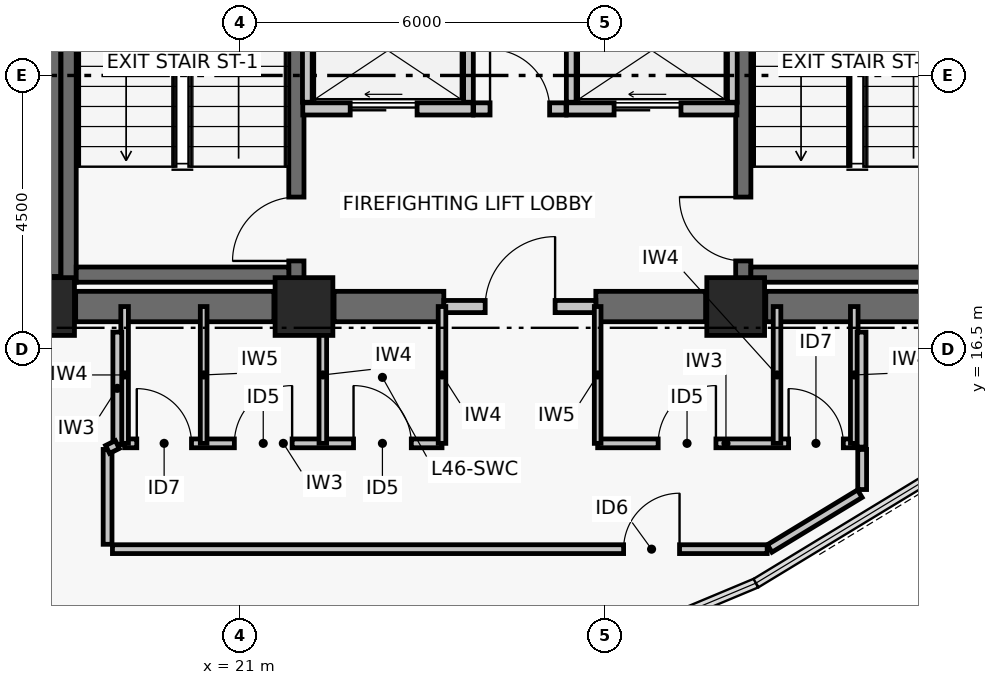
"""IFC4 building model, lengths in metres.
Left out: names, types, materials, properties, quantities, classifications, styles, units other than length and angle.
Written with IfcOpenShell. Run it as: python <this file> out.ifc"""

import sys

from ifc_helpers import new_model, si_unit, direction, frame, frame_2d, origin, origin_2d, place, context, subcontext, project, spatial, rectangle, extrude, element, fill, save


model = new_model("IFC4")
c1 = context("Model", 3, precision=1e-05, world=origin(), true_north=direction((0.0, 1.0)))
c2 = subcontext(c1, "Body", "Model", "MODEL_VIEW")
j1 = project(units=[si_unit("LENGTHUNIT", "METRE"), si_unit("PLANEANGLEUNIT", "RADIAN")], contexts=[c1])
p1 = place(None, origin())
s1 = spatial("IfcSite", under=j1, at=p1, CompositionType="ELEMENT")
p2 = place(p1, origin())
s2 = spatial("IfcBuilding", under=s1, at=p2, CompositionType="ELEMENT")
p3 = place(p2, frame((0.0, 0.0, 184.08)))
s3 = spatial("IfcBuildingStorey", under=s2, at=p3, CompositionType="ELEMENT", Elevation=184.08)
for number, where, z_axis, x_axis in (
    (1, (17.8, 17.2, 0.0), (0.0, 0.0, 1.0), (1.0, 0.0, 0.0)),
    (2, (22.05, 17.2, 0.0), (0.0, 0.0, 1.0), (1.0, 0.0, 0.0)),
    (3, (29.15, 17.2, 0.0), (0.0, 0.0, 1.0), (1.0, 0.0, 0.0)),
):
    element("IfcColumn", number, at=place(p3, frame(where, z_axis=z_axis, x_axis=x_axis)), inside=s3, PredefinedType="COLUMN", context=c2, shape_type="SweptSolid", body=[
        extrude(rectangle(XDim=0.95, YDim=0.95, at=origin_2d()), origin(), (0.0, 0.0, 1.0), 3.72),
    ])
p4 = place(p3, frame((18.295, 17.2, 0.0), z_axis=(0.0, 0.0, 1.0), x_axis=(1.0, 0.0, 0.0)))
e4 = element("IfcWall", 4, at=p4, inside=s3, PredefinedType="SHEAR", context=c2, shape_type="SweptSolid", body=[
    extrude(rectangle(XDim=3.26, YDim=0.5, at=frame_2d((1.63, 0.0))), origin(), (0.0, 0.0, 1.0), 3.5),
])
p5 = place(p3, frame((22.545, 17.2, 0.0), z_axis=(0.0, 0.0, 1.0), x_axis=(1.0, 0.0, 0.0)))
e5 = element("IfcWall", 5, at=p5, inside=s3, PredefinedType="SHEAR", context=c2, shape_type="SweptSolid", body=[
    extrude(rectangle(XDim=1.805, YDim=0.5, at=frame_2d((0.903, 0.0))), origin(), (0.0, 0.0, 1.0), 3.5),
])
p6 = place(p3, frame((26.85, 17.2, 0.0), z_axis=(0.0, 0.0, 1.0), x_axis=(1.0, 0.0, 0.0)))
e6 = element("IfcWall", 6, at=p6, inside=s3, PredefinedType="SHEAR", context=c2, shape_type="SweptSolid", body=[
    extrude(rectangle(XDim=1.805, YDim=0.5, at=frame_2d((0.902, 0.0))), origin(), (0.0, 0.0, 1.0), 3.5),
])
p7 = place(p3, frame((29.645, 17.2, 0.0), z_axis=(0.0, 0.0, 1.0), x_axis=(1.0, 0.0, 0.0)))
e7 = element("IfcWall", 7, at=p7, inside=s3, PredefinedType="SHEAR", context=c2, shape_type="SweptSolid", body=[
    extrude(rectangle(XDim=3.26, YDim=0.5, at=frame_2d((1.63, 0.0))), origin(), (0.0, 0.0, 1.0), 3.5),
])
p8 = place(p3, frame((17.8, 17.695, 0.0), z_axis=(0.0, 0.0, 1.0), x_axis=(0.0, 1.0, 0.0)))
e8 = element("IfcWall", 8, at=p8, inside=s3, PredefinedType="SHEAR", context=c2, shape_type="SweptSolid", body=[
    extrude(rectangle(XDim=8.61, YDim=0.5, at=frame_2d((4.305, 0.0))), origin(), (0.0, 0.0, 1.0), 3.5),
])
p9 = place(p3, frame((18.179, 17.6, 0.0), z_axis=(0.0, 0.0, 1.0), x_axis=(0.0, 1.0, 0.0)))
e9 = element("IfcWall", 9, at=p9, inside=s3, PredefinedType="SHEAR", context=c2, shape_type="SweptSolid", body=[
    extrude(rectangle(XDim=8.8, YDim=0.25, at=frame_2d((4.4, 0.0))), origin(), (0.0, 0.0, 1.0), 3.5),
])
p10 = place(p3, frame((21.925, 17.6, 0.0), z_axis=(0.0, 0.0, 1.0), x_axis=(0.0, 1.0, 0.0)))
e10 = element("IfcWall", 10, at=p10, inside=s3, PredefinedType="SHEAR", context=c2, shape_type="SweptSolid", body=[
    extrude(rectangle(XDim=8.8, YDim=0.25, at=frame_2d((4.4, 0.0))), origin(), (0.0, 0.0, 1.0), 3.5),
])
p11 = place(p10, frame((0.35, 0.0, 0.0)))
e11 = element("IfcOpeningElement", 11, at=p11, cuts=e10, PredefinedType="OPENING", context=c2, shape_type="SweptSolid", body=[
    extrude(rectangle(XDim=1.05, YDim=2.08, at=frame_2d((0.525, 1.04))), frame((0.0, 0.135, 0.0), z_axis=(0.0, -1.0, 0.0), x_axis=(1.0, 0.0, 0.0)), (0.0, 0.0, 1.0), 0.27),
])
p12 = place(p3, frame((18.304, 17.725, 0.0), z_axis=(0.0, 0.0, 1.0), x_axis=(1.0, 0.0, 0.0)))
e12 = element("IfcWall", 12, at=p12, inside=s3, PredefinedType="SHEAR", context=c2, shape_type="SweptSolid", body=[
    extrude(rectangle(XDim=3.496, YDim=0.25, at=frame_2d((1.748, 0.0))), origin(), (0.0, 0.0, 1.0), 3.5),
])
p13 = place(p3, frame((29.275, 17.6, 0.0), z_axis=(0.0, 0.0, 1.0), x_axis=(0.0, 1.0, 0.0)))
e13 = element("IfcWall", 13, at=p13, inside=s3, PredefinedType="SHEAR", context=c2, shape_type="SweptSolid", body=[
    extrude(rectangle(XDim=8.8, YDim=0.25, at=frame_2d((4.4, 0.0))), origin(), (0.0, 0.0, 1.0), 3.5),
])
p14 = place(p13, frame((0.35, 0.0, 0.0)))
e14 = element("IfcOpeningElement", 14, at=p14, cuts=e13, PredefinedType="OPENING", context=c2, shape_type="SweptSolid", body=[
    extrude(rectangle(XDim=1.05, YDim=2.08, at=frame_2d((0.525, 1.04))), frame((0.0, 0.135, 0.0), z_axis=(0.0, -1.0, 0.0), x_axis=(1.0, 0.0, 0.0)), (0.0, 0.0, 1.0), 0.27),
])
p15 = place(p3, frame((29.4, 17.725, 0.0), z_axis=(0.0, 0.0, 1.0), x_axis=(1.0, 0.0, 0.0)))
e15 = element("IfcWall", 15, at=p15, inside=s3, PredefinedType="SHEAR", context=c2, shape_type="SweptSolid", body=[
    extrude(rectangle(XDim=3.496, YDim=0.25, at=frame_2d((1.748, 0.0))), origin(), (0.0, 0.0, 1.0), 3.5),
])
p16 = place(p3, frame((24.35, 17.2, 0.0), z_axis=(0.0, 0.0, 1.0), x_axis=(1.0, 0.0, 0.0)))
e16 = element("IfcWall", 16, at=p16, inside=s3, PredefinedType="PARTITIONING", context=c2, shape_type="SweptSolid", body=[
    extrude(rectangle(XDim=2.5, YDim=0.2, at=frame_2d((1.25, 0.0))), origin(), (0.0, 0.0, 1.0), 2.63),
])
p17 = place(p16, frame((0.68, 0.0, 0.0)))
e17 = element("IfcOpeningElement", 17, at=p17, cuts=e16, PredefinedType="OPENING", context=c2, shape_type="SweptSolid", body=[
    extrude(rectangle(XDim=1.15, YDim=2.08, at=frame_2d((0.575, 1.04))), frame((0.0, 0.11, 0.0), z_axis=(0.0, -1.0, 0.0), x_axis=(1.0, 0.0, 0.0)), (0.0, 0.0, 1.0), 0.22),
])
p18 = place(p3, frame((24.84, 20.45, 0.0), z_axis=(0.0, 0.0, 1.0), x_axis=(1.0, 0.0, 0.0)))
e18 = element("IfcWall", 18, at=p18, inside=s3, PredefinedType="PARTITIONING", context=c2, shape_type="SweptSolid", body=[
    extrude(rectangle(XDim=1.52, YDim=0.2, at=frame_2d((0.76, 0.0))), origin(), (0.0, 0.0, 1.0), 3.5),
])
p19 = place(p18, frame((0.27, 0.0, 0.0)))
e19 = element("IfcOpeningElement", 19, at=p19, cuts=e18, PredefinedType="OPENING", context=c2, shape_type="SweptSolid", body=[
    extrude(rectangle(XDim=0.98, YDim=2.06, at=frame_2d((0.49, 1.03))), frame((0.0, 0.11, 0.0), z_axis=(0.0, -1.0, 0.0), x_axis=(1.0, 0.0, 0.0)), (0.0, 0.0, 1.0), 0.22),
])
p20 = place(p3, frame((22.03, 20.45, 0.0), z_axis=(0.0, 0.0, 1.0), x_axis=(1.0, 0.0, 0.0)))
e20 = element("IfcWall", 20, at=p20, inside=s3, PredefinedType="PARTITIONING", context=c2, shape_type="SweptSolid", body=[
    extrude(rectangle(XDim=2.8, YDim=0.2, at=frame_2d((1.4, 0.0))), origin(), (0.0, 0.0, 1.0), 3.5),
])
p21 = place(p20, frame((0.78, 0.0, 0.0)))
e21 = element("IfcOpeningElement", 21, at=p21, cuts=e20, PredefinedType="OPENING", context=c2, shape_type="SweptSolid", body=[
    extrude(rectangle(XDim=1.1, YDim=2.08, at=frame_2d((0.55, 1.04))), frame((0.0, 0.11, 0.0), z_axis=(0.0, -1.0, 0.0), x_axis=(1.0, 0.0, 0.0)), (0.0, 0.0, 1.0), 0.22),
])
p22 = place(p3, frame((26.37, 20.45, 0.0), z_axis=(0.0, 0.0, 1.0), x_axis=(1.0, 0.0, 0.0)))
e22 = element("IfcWall", 22, at=p22, inside=s3, PredefinedType="PARTITIONING", context=c2, shape_type="SweptSolid", body=[
    extrude(rectangle(XDim=2.8, YDim=0.2, at=frame_2d((1.4, 0.0))), origin(), (0.0, 0.0, 1.0), 3.5),
])
p23 = place(p22, frame((0.78, 0.0, 0.0)))
e23 = element("IfcOpeningElement", 23, at=p23, cuts=e22, PredefinedType="OPENING", context=c2, shape_type="SweptSolid", body=[
    extrude(rectangle(XDim=1.1, YDim=2.08, at=frame_2d((0.55, 1.04))), frame((0.0, 0.11, 0.0), z_axis=(0.0, -1.0, 0.0), x_axis=(1.0, 0.0, 0.0)), (0.0, 0.0, 1.0), 0.22),
])
for number, where, z_axis, x_axis in (
    (24, (22.105, 20.56, 0.0), (0.0, 0.0, 1.0), (0.0, 1.0, 0.0)),
    (25, (24.755, 20.56, 0.0), (0.0, 0.0, 1.0), (0.0, 1.0, 0.0)),
):
    element("IfcWall", number, at=place(p3, frame(where, z_axis=z_axis, x_axis=x_axis)), inside=s3, PredefinedType="PARTITIONING", context=c2, shape_type="SweptSolid", body=[
        extrude(rectangle(XDim=1.71, YDim=0.16, at=frame_2d((0.855, 0.0))), origin(), (0.0, 0.0, 1.0), 3.5),
    ])
p24 = place(p3, frame((29.095, 20.56, 0.0), z_axis=(0.0, 0.0, 1.0), x_axis=(0.0, 1.0, 0.0)))
e26 = element("IfcWall", 26, at=p24, inside=s3, PredefinedType="PARTITIONING", context=c2, shape_type="SweptSolid", body=[
    extrude(rectangle(XDim=5.45, YDim=0.16, at=frame_2d((2.725, 0.0))), origin(), (0.0, 0.0, 1.0), 3.5),
])
p25 = place(p3, frame((26.445, 20.56, 0.0), z_axis=(0.0, 0.0, 1.0), x_axis=(0.0, 1.0, 0.0)))
e27 = element("IfcWall", 27, at=p25, inside=s3, PredefinedType="PARTITIONING", context=c2, shape_type="SweptSolid", body=[
    extrude(rectangle(XDim=1.71, YDim=0.16, at=frame_2d((0.855, 0.0))), origin(), (0.0, 0.0, 1.0), 3.5),
])
p26 = place(p3, frame((19.1, 14.95, 0.0), z_axis=(0.0, 0.0, 1.0), x_axis=(1.0, 0.0, 0.0)))
e28 = element("IfcWall", 28, at=p26, inside=s3, PredefinedType="PARTITIONING", context=c2, shape_type="SweptSolid", body=[
    extrude(rectangle(XDim=5.22, YDim=0.145, at=frame_2d((2.61, 0.0))), origin(), (0.0, 0.0, 1.0), 2.73),
])
p27 = place(p26, frame((0.2, 0.0, 0.0)))
e29 = element("IfcOpeningElement", 29, at=p27, cuts=e28, PredefinedType="OPENING", context=c2, shape_type="SweptSolid", body=[
    extrude(rectangle(XDim=0.9, YDim=2.02, at=frame_2d((0.45, 1.01))), frame((0.0, 0.083, 0.0), z_axis=(0.0, -1.0, 0.0), x_axis=(1.0, 0.0, 0.0)), (0.0, 0.0, 1.0), 0.165),
])
p28 = place(p26, frame((1.805, 0.0, 0.0)))
e30 = element("IfcOpeningElement", 30, at=p28, cuts=e28, PredefinedType="OPENING", context=c2, shape_type="SweptSolid", body=[
    extrude(rectangle(XDim=0.95, YDim=2.06, at=frame_2d((0.475, 1.03))), frame((0.0, 0.083, 0.0), z_axis=(0.0, -1.0, 0.0), x_axis=(1.0, 0.0, 0.0)), (0.0, 0.0, 1.0), 0.165),
])
p29 = place(p26, frame((3.765, 0.0, 0.0)))
e31 = element("IfcOpeningElement", 31, at=p29, cuts=e28, PredefinedType="OPENING", context=c2, shape_type="SweptSolid", body=[
    extrude(rectangle(XDim=0.95, YDim=2.06, at=frame_2d((0.475, 1.03))), frame((0.0, 0.083, 0.0), z_axis=(0.0, -1.0, 0.0), x_axis=(1.0, 0.0, 0.0)), (0.0, 0.0, 1.0), 0.165),
])
p30 = place(p3, frame((26.88, 14.95, 0.0), z_axis=(0.0, 0.0, 1.0), x_axis=(1.0, 0.0, 0.0)))
e32 = element("IfcWall", 32, at=p30, inside=s3, PredefinedType="PARTITIONING", context=c2, shape_type="SweptSolid", body=[
    extrude(rectangle(XDim=4.22, YDim=0.145, at=frame_2d((2.11, 0.0))), origin(), (0.0, 0.0, 1.0), 2.93),
])
p31 = place(p30, frame((0.995, 0.0, 0.0)))
e33 = element("IfcOpeningElement", 33, at=p31, cuts=e32, PredefinedType="OPENING", context=c2, shape_type="SweptSolid", body=[
    extrude(rectangle(XDim=0.95, YDim=2.06, at=frame_2d((0.475, 1.03))), frame((0.0, 0.083, 0.0), z_axis=(0.0, -1.0, 0.0), x_axis=(1.0, 0.0, 0.0)), (0.0, 0.0, 1.0), 0.165),
])
p32 = place(p30, frame((3.14, 0.0, 0.0)))
e34 = element("IfcOpeningElement", 34, at=p32, cuts=e32, PredefinedType="OPENING", context=c2, shape_type="SweptSolid", body=[
    extrude(rectangle(XDim=0.9, YDim=2.02, at=frame_2d((0.45, 1.01))), frame((0.0, 0.083, 0.0), z_axis=(0.0, -1.0, 0.0), x_axis=(1.0, 0.0, 0.0)), (0.0, 0.0, 1.0), 0.165),
])
p33 = place(p3, frame((19.1, 14.95, 0.0), z_axis=(0.0, 0.0, 1.0), x_axis=(0.0, 1.0, 0.0)))
e35 = element("IfcWall", 35, at=p33, inside=s3, PredefinedType="PARTITIONING", context=c2, shape_type="SweptSolid", body=[
    extrude(rectangle(XDim=2.25, YDim=0.125, at=frame_2d((1.125, 0.0))), origin(), (0.0, 0.0, 1.0), 2.63),
])
p34 = place(p3, frame((20.4, 14.95, 0.0), z_axis=(0.0, 0.0, 1.0), x_axis=(0.0, 1.0, 0.0)))
e36 = element("IfcWall", 36, at=p34, inside=s3, PredefinedType="PARTITIONING", context=c2, shape_type="SweptSolid", body=[
    extrude(rectangle(XDim=2.25, YDim=0.11, at=frame_2d((1.125, 0.0))), origin(), (0.0, 0.0, 1.0), 2.63),
])
for number, where, z_axis, x_axis in (
    (37, (22.36, 14.95, 0.0), (0.0, 0.0, 1.0), (0.0, 1.0, 0.0)),
    (38, (24.32, 14.95, 0.0), (0.0, 0.0, 1.0), (0.0, 1.0, 0.0)),
):
    element("IfcWall", number, at=place(p3, frame(where, z_axis=z_axis, x_axis=x_axis)), inside=s3, PredefinedType="PARTITIONING", context=c2, shape_type="SweptSolid", body=[
        extrude(rectangle(XDim=2.25, YDim=0.125, at=frame_2d((1.125, 0.0))), origin(), (0.0, 0.0, 1.0), 2.63),
    ])
p35 = place(p3, frame((26.88, 14.95, 0.0), z_axis=(0.0, 0.0, 1.0), x_axis=(0.0, 1.0, 0.0)))
e39 = element("IfcWall", 39, at=p35, inside=s3, PredefinedType="PARTITIONING", context=c2, shape_type="SweptSolid", body=[
    extrude(rectangle(XDim=2.25, YDim=0.11, at=frame_2d((1.125, 0.0))), origin(), (0.0, 0.0, 1.0), 2.63),
])
for number, where, z_axis, x_axis in (
    (40, (29.83, 14.95, 0.0), (0.0, 0.0, 1.0), (0.0, 1.0, 0.0)),
    (41, (31.1, 14.95, 0.0), (0.0, 0.0, 1.0), (0.0, 1.0, 0.0)),
):
    element("IfcWall", number, at=place(p3, frame(where, z_axis=z_axis, x_axis=x_axis)), inside=s3, PredefinedType="PARTITIONING", context=c2, shape_type="SweptSolid", body=[
        extrude(rectangle(XDim=2.25, YDim=0.125, at=frame_2d((1.125, 0.0))), origin(), (0.0, 0.0, 1.0), 2.63),
    ])
p36 = place(p3, frame((18.98, 16.78, 0.0), z_axis=(0.0, 0.0, 1.0), x_axis=(0.0, -1.0, 0.0)))
e42 = element("IfcWall", 42, at=p36, inside=s3, PredefinedType="PARTITIONING", context=c2, shape_type="SweptSolid", body=[
    extrude(rectangle(XDim=1.85, YDim=0.145, at=frame_2d((0.925, 0.0))), origin(), (0.0, 0.0, 1.0), 2.63),
])
p37 = place(p3, frame((18.82, 14.85, 0.0), z_axis=(0.0, 0.0, 1.0), x_axis=(0.0, -1.0, 0.0)))
e43 = element("IfcWall", 43, at=p37, inside=s3, PredefinedType="PARTITIONING", context=c2, shape_type="SweptSolid", body=[
    extrude(rectangle(XDim=1.56, YDim=0.145, at=frame_2d((0.78, 0.0))), origin(), (0.0, 0.0, 1.0), 3.08),
])
p38 = place(p3, frame((18.9, 13.21, 0.0), z_axis=(0.0, 0.0, 1.0), x_axis=(1.0, 0.0, 0.0)))
e44 = element("IfcWall", 44, at=p38, inside=s3, PredefinedType="PARTITIONING", context=c2, shape_type="SweptSolid", body=[
    extrude(rectangle(XDim=10.768, YDim=0.145, at=frame_2d((5.384, 0.0))), origin(), (0.0, 0.0, 1.0), 2.73),
])
p39 = place(p38, frame((8.406, 0.0, 0.0)))
e45 = element("IfcOpeningElement", 45, at=p39, cuts=e44, PredefinedType="OPENING", context=c2, shape_type="SweptSolid", body=[
    extrude(rectangle(XDim=0.92, YDim=2.05, at=frame_2d((0.46, 1.025))), frame((0.0, 0.083, 0.0), z_axis=(0.0, -1.0, 0.0), x_axis=(1.0, 0.0, 0.0)), (0.0, 0.0, 1.0), 0.165),
])
p40 = place(p3, frame((29.709, 13.222, 0.0), z_axis=(0.0, 0.0, 1.0), x_axis=(0.854635840942, 0.519227868451, 0.0)))
e46 = element("IfcWall", 46, at=p40, inside=s3, PredefinedType="PARTITIONING", context=c2, shape_type="SweptSolid", body=[
    extrude(rectangle(XDim=1.735, YDim=0.145, at=frame_2d((0.867, 0.0))), origin(), (0.0, 0.0, 1.0), 3.5),
])
p41 = place(p3, frame((31.23, 14.191, 0.0), z_axis=(0.0, 0.0, 1.0), x_axis=(0.0, 1.0, 0.0)))
e47 = element("IfcWall", 47, at=p41, inside=s3, PredefinedType="PARTITIONING", context=c2, shape_type="SweptSolid", body=[
    extrude(rectangle(XDim=0.659, YDim=0.145, at=frame_2d((0.33, 0.0))), origin(), (0.0, 0.0, 1.0), 3.5),
])
p42 = place(p3, frame((31.22, 14.889, 0.0), z_axis=(0.0, 0.0, 1.0), x_axis=(0.0, 1.0, 0.0)))
e48 = element("IfcWall", 48, at=p42, inside=s3, PredefinedType="PARTITIONING", context=c2, shape_type="SweptSolid", body=[
    extrude(rectangle(XDim=1.891, YDim=0.145, at=frame_2d((0.946, 0.0))), origin(), (0.0, 0.0, 1.0), 2.63),
])
p43 = place(p3, frame((18.82, 14.85, 0.0), z_axis=(0.0, 0.0, 1.0), x_axis=(0.89470021502, 0.446667130247, 0.0)))
e49 = element("IfcWall", 49, at=p43, inside=s3, PredefinedType="PARTITIONING", context=c2, shape_type="SweptSolid", body=[
    extrude(rectangle(XDim=0.179, YDim=0.145, at=frame_2d((0.089, 0.0))), origin(), (0.0, 0.0, 1.0), 3.5),
])
p44 = place(p11, origin())
e50 = element("IfcDoor", 50, at=p44, inside=s3, OperationType="SINGLE_SWING_LEFT", PredefinedType="DOOR", context=c2, shape_type="SweptSolid", body=[
    extrude(rectangle(XDim=1.05, YDim=2.08, at=frame_2d((0.525, 1.04))), frame((0.0, 0.025, 0.0), z_axis=(0.0, -1.0, 0.0), x_axis=(1.0, 0.0, 0.0)), (0.0, 0.0, 1.0), 0.05),
])
fill(e11, e50)
p45 = place(p14, origin())
e51 = element("IfcDoor", 51, at=p45, inside=s3, OperationType="SINGLE_SWING_RIGHT", PredefinedType="DOOR", context=c2, shape_type="SweptSolid", body=[
    extrude(rectangle(XDim=1.05, YDim=2.08, at=frame_2d((0.525, 1.04))), frame((0.0, 0.025, 0.0), z_axis=(0.0, -1.0, 0.0), x_axis=(1.0, 0.0, 0.0)), (0.0, 0.0, 1.0), 0.05),
])
fill(e14, e51)
p46 = place(p17, origin())
e52 = element("IfcDoor", 52, at=p46, inside=s3, OperationType="SINGLE_SWING_RIGHT", PredefinedType="DOOR", context=c2, shape_type="SweptSolid", body=[
    extrude(rectangle(XDim=1.15, YDim=2.08, at=frame_2d((0.575, 1.04))), frame((0.0, 0.025, 0.0), z_axis=(0.0, -1.0, 0.0), x_axis=(1.0, 0.0, 0.0)), (0.0, 0.0, 1.0), 0.05),
])
fill(e17, e52)
p47 = place(p19, origin())
e53 = element("IfcDoor", 53, at=p47, inside=s3, OperationType="SINGLE_SWING_LEFT", PredefinedType="DOOR", context=c2, shape_type="SweptSolid", body=[
    extrude(rectangle(XDim=0.98, YDim=2.06, at=frame_2d((0.49, 1.03))), frame((0.0, 0.025, 0.0), z_axis=(0.0, -1.0, 0.0), x_axis=(1.0, 0.0, 0.0)), (0.0, 0.0, 1.0), 0.05),
])
fill(e19, e53)
p48 = place(p21, origin())
e54 = element("IfcDoor", 54, at=p48, inside=s3, OperationType="DOUBLE_DOOR_SLIDING", PredefinedType="DOOR", context=c2, shape_type="SweptSolid", body=[
    extrude(rectangle(XDim=1.1, YDim=2.08, at=frame_2d((0.55, 1.04))), frame((0.0, 0.025, 0.0), z_axis=(0.0, -1.0, 0.0), x_axis=(1.0, 0.0, 0.0)), (0.0, 0.0, 1.0), 0.05),
])
fill(e21, e54)
p49 = place(p23, origin())
e55 = element("IfcDoor", 55, at=p49, inside=s3, OperationType="DOUBLE_DOOR_SLIDING", PredefinedType="DOOR", context=c2, shape_type="SweptSolid", body=[
    extrude(rectangle(XDim=1.1, YDim=2.08, at=frame_2d((0.55, 1.04))), frame((0.0, 0.025, 0.0), z_axis=(0.0, -1.0, 0.0), x_axis=(1.0, 0.0, 0.0)), (0.0, 0.0, 1.0), 0.05),
])
fill(e23, e55)
p50 = place(p27, origin())
e56 = element("IfcDoor", 56, at=p50, inside=s3, OperationType="SINGLE_SWING_LEFT", PredefinedType="DOOR", context=c2, shape_type="SweptSolid", body=[
    extrude(rectangle(XDim=0.9, YDim=2.02, at=frame_2d((0.45, 1.01))), frame((0.0, 0.025, 0.0), z_axis=(0.0, -1.0, 0.0), x_axis=(1.0, 0.0, 0.0)), (0.0, 0.0, 1.0), 0.05),
])
fill(e29, e56)
p51 = place(p28, origin())
e57 = element("IfcDoor", 57, at=p51, inside=s3, OperationType="SINGLE_SWING_RIGHT", PredefinedType="DOOR", context=c2, shape_type="SweptSolid", body=[
    extrude(rectangle(XDim=0.95, YDim=2.06, at=frame_2d((0.475, 1.03))), frame((0.0, 0.025, 0.0), z_axis=(0.0, -1.0, 0.0), x_axis=(1.0, 0.0, 0.0)), (0.0, 0.0, 1.0), 0.05),
])
fill(e30, e57)
p52 = place(p29, origin())
e58 = element("IfcDoor", 58, at=p52, inside=s3, OperationType="SINGLE_SWING_LEFT", PredefinedType="DOOR", context=c2, shape_type="SweptSolid", body=[
    extrude(rectangle(XDim=0.95, YDim=2.06, at=frame_2d((0.475, 1.03))), frame((0.0, 0.025, 0.0), z_axis=(0.0, -1.0, 0.0), x_axis=(1.0, 0.0, 0.0)), (0.0, 0.0, 1.0), 0.05),
])
fill(e31, e58)
p53 = place(p31, origin())
e59 = element("IfcDoor", 59, at=p53, inside=s3, OperationType="SINGLE_SWING_RIGHT", PredefinedType="DOOR", context=c2, shape_type="SweptSolid", body=[
    extrude(rectangle(XDim=0.95, YDim=2.06, at=frame_2d((0.475, 1.03))), frame((0.0, 0.025, 0.0), z_axis=(0.0, -1.0, 0.0), x_axis=(1.0, 0.0, 0.0)), (0.0, 0.0, 1.0), 0.05),
])
fill(e33, e59)
p54 = place(p32, origin())
e60 = element("IfcDoor", 60, at=p54, inside=s3, OperationType="SINGLE_SWING_LEFT", PredefinedType="DOOR", context=c2, shape_type="SweptSolid", body=[
    extrude(rectangle(XDim=0.9, YDim=2.02, at=frame_2d((0.45, 1.01))), frame((0.0, 0.025, 0.0), z_axis=(0.0, -1.0, 0.0), x_axis=(1.0, 0.0, 0.0)), (0.0, 0.0, 1.0), 0.05),
])
fill(e34, e60)
p55 = place(p39, origin())
e61 = element("IfcDoor", 61, at=p55, inside=s3, OperationType="SINGLE_SWING_RIGHT", PredefinedType="DOOR", context=c2, shape_type="SweptSolid", body=[
    extrude(rectangle(XDim=0.92, YDim=2.05, at=frame_2d((0.46, 1.025))), frame((0.0, 0.025, 0.0), z_axis=(0.0, -1.0, 0.0), x_axis=(1.0, 0.0, 0.0)), (0.0, 0.0, 1.0), 0.05),
])
fill(e45, e61)
save(model, sys.argv[1])
